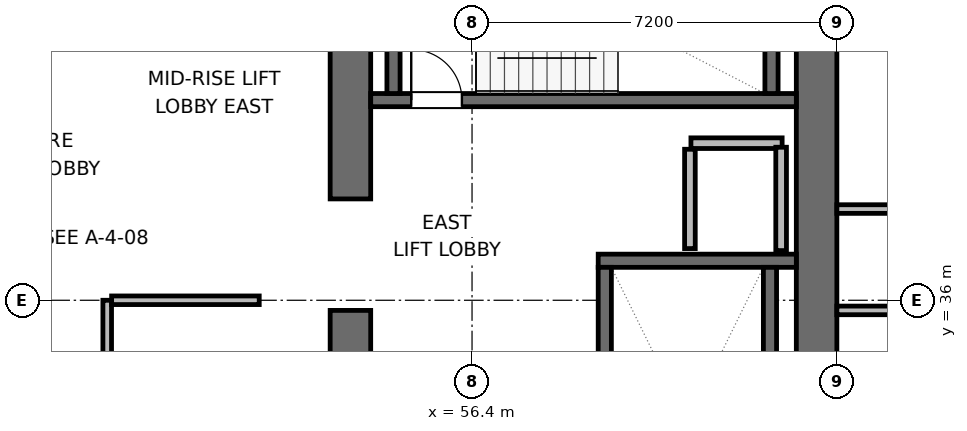
"""IFC4 building model, lengths in metres.
Left out: names, types, materials, properties, quantities, classifications, styles, units other than length and angle.
Written with IfcOpenShell. Run it as: python <this file> out.ifc"""

import sys

from ifc_helpers import new_model, si_unit, direction, frame, frame_2d, origin, place, context, subcontext, project, spatial, rectangle, extrude, element, fill, save


model = new_model("IFC4")
c1 = context("Model", 3, precision=1e-05, world=origin(), true_north=direction((0.0, 1.0)))
c2 = subcontext(c1, "Body", "Model", "MODEL_VIEW")
j1 = project(units=[si_unit("LENGTHUNIT", "METRE"), si_unit("PLANEANGLEUNIT", "RADIAN")], contexts=[c1])
p1 = place(None, origin())
s1 = spatial("IfcSite", under=j1, at=p1, CompositionType="ELEMENT")
p2 = place(p1, origin())
s2 = spatial("IfcBuilding", under=s1, at=p2, CompositionType="ELEMENT")
p3 = place(p2, frame((0.0, 0.0, 133.8)))
s3 = spatial("IfcBuildingStorey", under=s2, at=p3, CompositionType="ELEMENT", Elevation=133.8)
p4 = place(p3, frame((54.0, 28.0, 0.0), z_axis=(0.0, 0.0, 1.0), x_axis=(0.0, 1.0, 0.0)))
e1 = element("IfcWall", 1, at=p4, inside=s3, PredefinedType="SHEAR", context=c2, shape_type="SweptSolid", body=[
    extrude(rectangle(XDim=7.8, YDim=0.8, at=frame_2d((3.9, 0.0))), origin(), (0.0, 0.0, 1.0), 3.9),
])
p5 = place(p3, frame((54.0, 38.0, 0.0), z_axis=(0.0, 0.0, 1.0), x_axis=(0.0, 1.0, 0.0)))
e2 = element("IfcWall", 2, at=p5, inside=s3, PredefinedType="SHEAR", context=c2, shape_type="SweptSolid", body=[
    extrude(rectangle(XDim=6.0, YDim=0.8, at=frame_2d((3.0, 0.0))), origin(), (0.0, 0.0, 1.0), 3.9),
])
p6 = place(p3, frame((63.2, 27.6, 0.0), z_axis=(0.0, 0.0, 1.0), x_axis=(0.0, 1.0, 0.0)))
e3 = element("IfcWall", 3, at=p6, inside=s3, PredefinedType="SHEAR", context=c2, shape_type="SweptSolid", body=[
    extrude(rectangle(XDim=16.8, YDim=0.8, at=frame_2d((8.4, 0.0))), origin(), (0.0, 0.0, 1.0), 3.9),
])
p7 = place(p3, frame((58.89, 36.78, 0.0), z_axis=(0.0, 0.0, 1.0), x_axis=(1.0, 0.0, 0.0)))
e4 = element("IfcWall", 4, at=p7, inside=s3, PredefinedType="SHEAR", context=c2, shape_type="SweptSolid", body=[
    extrude(rectangle(XDim=3.91, YDim=0.26, at=frame_2d((1.955, 0.0))), origin(), (0.0, 0.0, 1.0), 3.9),
])
p8 = place(p3, frame((59.02, 29.05, 0.0), z_axis=(0.0, 0.0, 1.0), x_axis=(0.0, 1.0, 0.0)))
e5 = element("IfcWall", 5, at=p8, inside=s3, PredefinedType="SHEAR", context=c2, shape_type="SweptSolid", body=[
    extrude(rectangle(XDim=7.6, YDim=0.26, at=frame_2d((3.8, 0.0))), origin(), (0.0, 0.0, 1.0), 3.9),
])
p9 = place(p8, frame((0.3, 0.0, 0.0)))
e6 = element("IfcOpeningElement", 6, at=p9, cuts=e5, PredefinedType="OPENING", context=c2, shape_type="SweptSolid", body=[
    extrude(rectangle(XDim=1.0, YDim=2.04, at=frame_2d((0.5, 1.02))), frame((0.0, 0.14, 0.0), z_axis=(0.0, -1.0, 0.0), x_axis=(1.0, 0.0, 0.0)), (0.0, 0.0, 1.0), 0.28),
])
p10 = place(p3, frame((62.28, 29.05, 0.0), z_axis=(0.0, 0.0, 1.0), x_axis=(0.0, 1.0, 0.0)))
e7 = element("IfcWall", 7, at=p10, inside=s3, PredefinedType="SHEAR", context=c2, shape_type="SweptSolid", body=[
    extrude(rectangle(XDim=7.6, YDim=0.26, at=frame_2d((3.8, 0.0))), origin(), (0.0, 0.0, 1.0), 3.9),
])
p11 = place(p3, frame((54.4, 39.95, 0.0), z_axis=(0.0, 0.0, 1.0), x_axis=(1.0, 0.0, 0.0)))
e8 = element("IfcWall", 8, at=p11, inside=s3, PredefinedType="SHEAR", context=c2, shape_type="SweptSolid", body=[
    extrude(rectangle(XDim=8.4, YDim=0.26, at=frame_2d((4.2, 0.0))), origin(), (0.0, 0.0, 1.0), 3.9),
])
p12 = place(p11, frame((0.8, 0.0, 0.0)))
e9 = element("IfcOpeningElement", 9, at=p12, cuts=e8, PredefinedType="OPENING", context=c2, shape_type="SweptSolid", body=[
    extrude(rectangle(XDim=1.0, YDim=2.04, at=frame_2d((0.5, 1.02))), frame((0.0, 0.14, 0.0), z_axis=(0.0, -1.0, 0.0), x_axis=(1.0, 0.0, 0.0)), (0.0, 0.0, 1.0), 0.28),
])
for number, where, z_axis, x_axis in (
    (10, (54.85, 40.08, 0.0), (0.0, 0.0, 1.0), (0.0, 1.0, 0.0)),
    (11, (62.31, 40.08, 0.0), (0.0, 0.0, 1.0), (0.0, 1.0, 0.0)),
):
    element("IfcWall", number, at=place(p3, frame(where, z_axis=z_axis, x_axis=x_axis)), inside=s3, PredefinedType="SHEAR", context=c2, shape_type="SweptSolid", body=[
        extrude(rectangle(XDim=2.94, YDim=0.26, at=frame_2d((1.47, 0.0))), origin(), (0.0, 0.0, 1.0), 3.9),
    ])
p13 = place(p3, frame((60.72, 39.1, 0.0), z_axis=(0.0, 0.0, 1.0), x_axis=(1.0, 0.0, 0.0)))
e12 = element("IfcWall", 12, at=p13, inside=s3, PredefinedType="PARTITIONING", context=c2, shape_type="SweptSolid", body=[
    extrude(rectangle(XDim=1.8, YDim=0.21, at=frame_2d((0.9, 0.0))), origin(), (0.0, 0.0, 1.0), 3.64),
])
p14 = place(p3, frame((60.7, 37.02, 0.0), z_axis=(0.0, 0.0, 1.0), x_axis=(0.0, 1.0, 0.0)))
e13 = element("IfcWall", 13, at=p14, inside=s3, PredefinedType="PARTITIONING", context=c2, shape_type="SweptSolid", body=[
    extrude(rectangle(XDim=1.96, YDim=0.21, at=frame_2d((0.98, 0.0))), origin(), (0.0, 0.0, 1.0), 3.64),
])
p15 = place(p3, frame((62.5, 36.98, 0.0), z_axis=(0.0, 0.0, 1.0), x_axis=(0.0, 1.0, 0.0)))
e14 = element("IfcWall", 14, at=p15, inside=s3, PredefinedType="PARTITIONING", context=c2, shape_type="SweptSolid", body=[
    extrude(rectangle(XDim=2.04, YDim=0.21, at=frame_2d((1.02, 0.0))), origin(), (0.0, 0.0, 1.0), 3.64),
])
p16 = place(p3, frame((49.2, 32.6, 0.0), z_axis=(0.0, 0.0, 1.0), x_axis=(0.0, 1.0, 0.0)))
e15 = element("IfcWall", 15, at=p16, inside=s3, PredefinedType="PARTITIONING", context=c2, shape_type="SweptSolid", body=[
    extrude(rectangle(XDim=3.4, YDim=0.17, at=frame_2d((1.7, 0.0))), origin(), (0.0, 0.0, 1.0), 3.64),
])
p17 = place(p16, frame((1.25, 0.0, 0.0)))
e16 = element("IfcOpeningElement", 16, at=p17, cuts=e15, PredefinedType="OPENING", context=c2, shape_type="SweptSolid", body=[
    extrude(rectangle(XDim=0.9, YDim=2.02, at=frame_2d((0.45, 1.01))), frame((0.0, 0.095, 0.0), z_axis=(0.0, -1.0, 0.0), x_axis=(1.0, 0.0, 0.0)), (0.0, 0.0, 1.0), 0.19),
])
p18 = place(p3, frame((49.287, 36.0, 0.0), z_axis=(0.0, 0.0, 1.0), x_axis=(1.0, 0.0, 0.0)))
e17 = element("IfcWall", 17, at=p18, inside=s3, PredefinedType="PARTITIONING", context=c2, shape_type="SweptSolid", body=[
    extrude(rectangle(XDim=2.913, YDim=0.17, at=frame_2d((1.457, 0.0))), origin(), (0.0, 0.0, 1.0), 3.64),
])
p19 = place(p3, frame((63.6, 35.8, 0.0), z_axis=(0.0, 0.0, 1.0), x_axis=(1.0, 0.0, 0.0)))
e18 = element("IfcWall", 18, at=p19, inside=s3, PredefinedType="PARTITIONING", context=c2, shape_type="SweptSolid", body=[
    extrude(rectangle(XDim=6.955, YDim=0.17, at=frame_2d((3.478, 0.0))), origin(), (0.0, 0.0, 1.0), 3.003),
])
p20 = place(p19, frame((1.1, 0.0, 0.0)))
e19 = element("IfcOpeningElement", 19, at=p20, cuts=e18, PredefinedType="OPENING", context=c2, shape_type="SweptSolid", body=[
    extrude(rectangle(XDim=0.95, YDim=2.04, at=frame_2d((0.475, 1.02))), frame((0.0, 0.095, 0.0), z_axis=(0.0, -1.0, 0.0), x_axis=(1.0, 0.0, 0.0)), (0.0, 0.0, 1.0), 0.19),
])
p21 = place(p3, frame((63.6, 37.8, 0.0), z_axis=(0.0, 0.0, 1.0), x_axis=(1.0, 0.0, 0.0)))
e20 = element("IfcWall", 20, at=p21, inside=s3, PredefinedType="PARTITIONING", context=c2, shape_type="SweptSolid", body=[
    extrude(rectangle(XDim=4.94, YDim=0.17, at=frame_2d((2.47, 0.0))), origin(), (0.0, 0.0, 1.0), 3.64),
])
p22 = place(p21, frame((1.1, 0.0, 0.0)))
e21 = element("IfcOpeningElement", 21, at=p22, cuts=e20, PredefinedType="OPENING", context=c2, shape_type="SweptSolid", body=[
    extrude(rectangle(XDim=0.95, YDim=2.04, at=frame_2d((0.475, 1.02))), frame((0.0, 0.095, 0.0), z_axis=(0.0, -1.0, 0.0), x_axis=(1.0, 0.0, 0.0)), (0.0, 0.0, 1.0), 0.19),
])
p23 = place(p12, origin())
e22 = element("IfcDoor", 22, at=p23, inside=s3, OperationType="SINGLE_SWING_LEFT", PredefinedType="DOOR", context=c2, shape_type="SweptSolid", body=[
    extrude(rectangle(XDim=1.0, YDim=2.04, at=frame_2d((0.5, 1.02))), frame((0.0, 0.025, 0.0), z_axis=(0.0, -1.0, 0.0), x_axis=(1.0, 0.0, 0.0)), (0.0, 0.0, 1.0), 0.05),
])
fill(e9, e22)
save(model, sys.argv[1])
